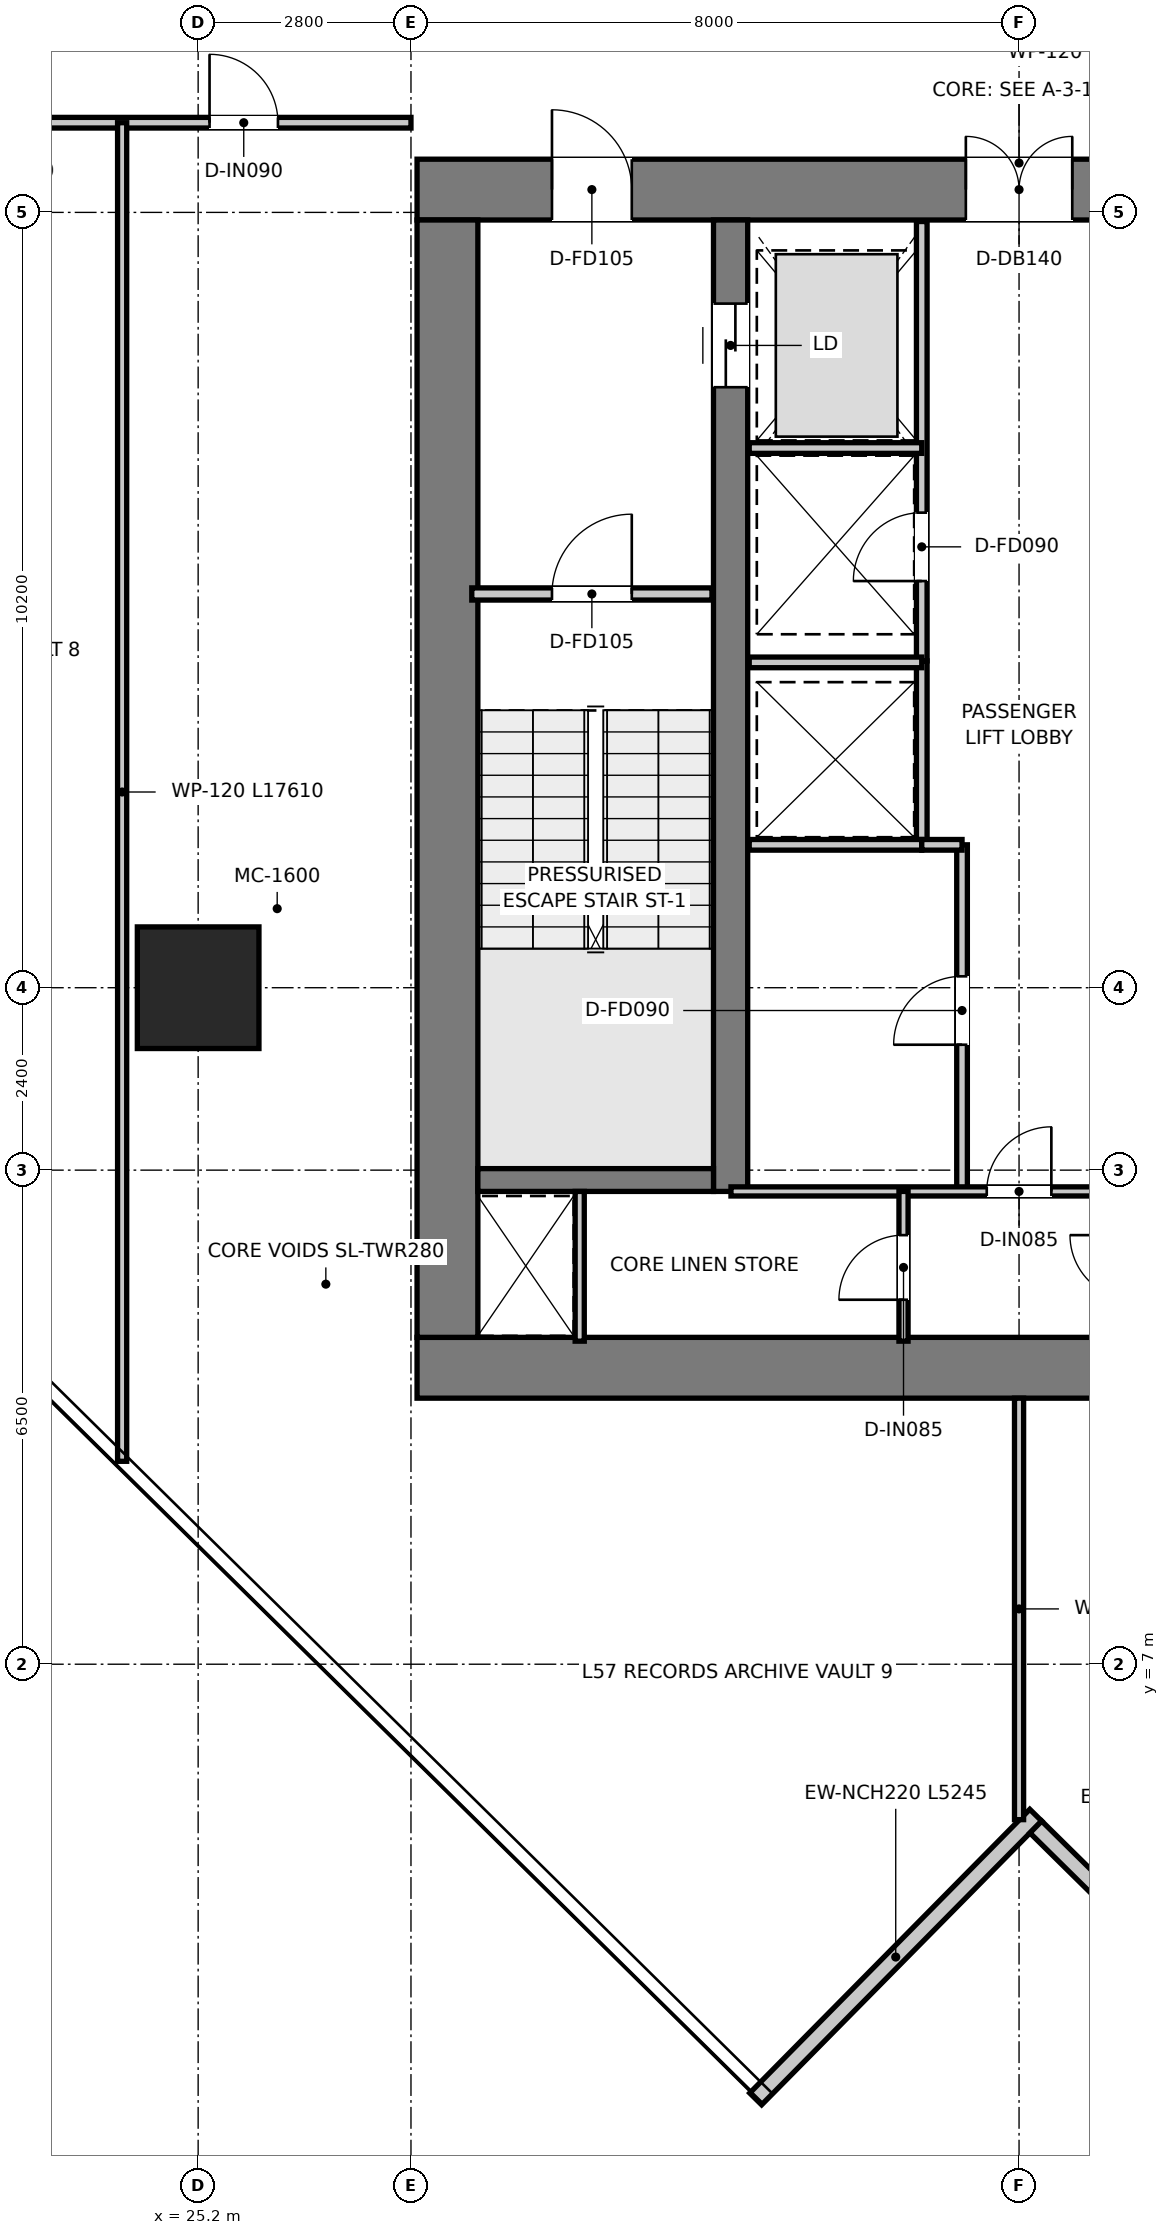
"""IFC4 building model, lengths in metres.
Left out: names, types, materials, properties, quantities, classifications, styles, units other than length and angle.
Written with IfcOpenShell. Run it as: python <this file> out.ifc"""

import sys

from ifc_helpers import new_model, si_unit, direction, frame, frame_2d, origin, origin_2d, place, context, subcontext, project, spatial, rectangle, extrude, source, transform, mapped, element, fill, save


model = new_model("IFC4")
c1 = context("Model", 3, precision=1e-05, world=origin(), true_north=direction((0.0, 1.0)))
c2 = subcontext(c1, "Body", "Model", "MODEL_VIEW")
j1 = project(units=[si_unit("LENGTHUNIT", "METRE"), si_unit("PLANEANGLEUNIT", "RADIAN")], contexts=[c1])
p1 = place(None, origin())
s1 = spatial("IfcSite", under=j1, at=p1, CompositionType="ELEMENT")
p2 = place(p1, origin())
s2 = spatial("IfcBuilding", under=s1, at=p2, CompositionType="ELEMENT")
p3 = place(p2, frame((0.0, 0.0, 234.95)))
s3 = spatial("IfcBuildingStorey", under=s2, at=p3, CompositionType="ELEMENT", Elevation=234.95)
p4 = place(p3, frame((28.08, 10.9, 0.0), z_axis=(0.0, 0.0, 1.0), x_axis=(1.0, 0.0, 0.0)))
e1 = element("IfcWall", 1, at=p4, inside=s3, PredefinedType="SHEAR", context=c2, shape_type="SweptSolid", body=[
    extrude(rectangle(XDim=15.84, YDim=0.8, at=frame_2d((7.92, 0.0))), origin(), (0.0, 0.0, 1.0), 3.95),
])
p5 = place(p3, frame((28.08, 26.4, 0.0), z_axis=(0.0, 0.0, 1.0), x_axis=(1.0, 0.0, 0.0)))
e2 = element("IfcWall", 2, at=p5, inside=s3, PredefinedType="SHEAR", context=c2, shape_type="SweptSolid", body=[
    extrude(rectangle(XDim=15.84, YDim=0.8, at=frame_2d((7.92, 0.0))), origin(), (0.0, 0.0, 1.0), 3.95),
])
p6 = place(p5, frame((7.22, 0.0, 0.0)))
e3 = element("IfcOpeningElement", 3, at=p6, cuts=e2, PredefinedType="OPENING", context=c2, shape_type="SweptSolid", body=[
    extrude(rectangle(XDim=1.4, YDim=2.2, at=frame_2d((0.7, 1.1))), frame((0.0, 0.41, 0.0), z_axis=(0.0, -1.0, 0.0), x_axis=(1.0, 0.0, 0.0)), (0.0, 0.0, 1.0), 0.82),
])
p7 = place(p5, frame((1.775, 0.0, 0.0)))
e4 = element("IfcOpeningElement", 4, at=p7, cuts=e2, PredefinedType="OPENING", context=c2, shape_type="SweptSolid", body=[
    extrude(rectangle(XDim=1.05, YDim=2.1, at=frame_2d((0.525, 1.05))), frame((0.0, 0.41, 0.0), z_axis=(0.0, -1.0, 0.0), x_axis=(1.0, 0.0, 0.0)), (0.0, 0.0, 1.0), 0.82),
])
p8 = place(p5, frame((13.015, 0.0, 0.0)))
e5 = element("IfcOpeningElement", 5, at=p8, cuts=e2, PredefinedType="OPENING", context=c2, shape_type="SweptSolid", body=[
    extrude(rectangle(XDim=1.05, YDim=2.1, at=frame_2d((0.525, 1.05))), frame((0.0, 0.41, 0.0), z_axis=(0.0, -1.0, 0.0), x_axis=(1.0, 0.0, 0.0)), (0.0, 0.0, 1.0), 0.82),
])
p9 = place(p3, frame((28.48, 11.3, 0.0), z_axis=(0.0, 0.0, 1.0), x_axis=(0.0, 1.0, 0.0)))
e6 = element("IfcWall", 6, at=p9, inside=s3, PredefinedType="SHEAR", context=c2, shape_type="SweptSolid", body=[
    extrude(rectangle(XDim=14.7, YDim=0.8, at=frame_2d((7.35, 0.0))), origin(), (0.0, 0.0, 1.0), 3.95),
])
p10 = place(p3, frame((32.205, 13.22, 0.0), z_axis=(0.0, 0.0, 1.0), x_axis=(0.0, 1.0, 0.0)))
e7 = element("IfcWall", 7, at=p10, inside=s3, PredefinedType="SHEAR", context=c2, shape_type="SweptSolid", body=[
    extrude(rectangle(XDim=12.78, YDim=0.45, at=frame_2d((6.39, 0.0))), origin(), (0.0, 0.0, 1.0), 3.95),
])
p11 = place(p10, frame((10.58, 0.0, 0.0)))
e8 = element("IfcOpeningElement", 8, at=p11, cuts=e7, PredefinedType="OPENING", context=c2, shape_type="SweptSolid", body=[
    extrude(rectangle(XDim=1.1, YDim=2.15, at=frame_2d((0.55, 1.075))), frame((0.0, 0.235, 0.0), z_axis=(0.0, -1.0, 0.0), x_axis=(1.0, 0.0, 0.0)), (0.0, 0.0, 1.0), 0.47),
])
p12 = place(p3, frame((28.88, 13.37, 0.0), z_axis=(0.0, 0.0, 1.0), x_axis=(1.0, 0.0, 0.0)))
e9 = element("IfcWall", 9, at=p12, inside=s3, PredefinedType="SHEAR", context=c2, shape_type="SweptSolid", body=[
    extrude(rectangle(XDim=3.1, YDim=0.3, at=frame_2d((1.55, 0.0))), origin(), (0.0, 0.0, 1.0), 3.95),
])
m1 = source(origin(), c2, "Body", "SweptSolid", [
    extrude(rectangle(XDim=1.6, YDim=1.6, at=origin_2d()), origin(), (0.0, 0.0, 1.0), 3.95),
])
p13 = place(p3, frame((25.2, 15.9, 0.0), z_axis=(0.0, 0.0, 1.0), x_axis=(1.0, 0.0, 0.0)))
e10 = element("IfcColumn", 10, at=p13, inside=s3, PredefinedType="USERDEFINED", context=c2, shape_type="MappedRepresentation", body=[
    mapped(m1, transform((0.0, 0.0, 0.0), x_axis=(1.0, 0.0, 0.0), y_axis=(0.0, 1.0, 0.0), z_axis=(0.0, 0.0, 1.0), scale=1.0)),
])
p14 = place(p3, frame((32.535, 1.281, 0.0), z_axis=(0.0, 0.0, 1.0), x_axis=(0.702460059039, 0.711723166305, 0.0)))
e11 = element("IfcWall", 11, at=p14, inside=s3, PredefinedType="ELEMENTEDWALL", context=c2, shape_type="SweptSolid", body=[
    extrude(rectangle(XDim=5.245, YDim=0.22, at=frame_2d((2.623, 0.0))), origin(), (0.0, 0.0, 1.0), 3.67),
])
p15 = place(p3, frame((36.221, 4.858, 0.0), z_axis=(0.0, 0.0, 1.0), x_axis=(0.711731489292, -0.702451626199, 0.0)))
e12 = element("IfcWall", 12, at=p15, inside=s3, PredefinedType="ELEMENTEDWALL", context=c2, shape_type="SweptSolid", body=[
    extrude(rectangle(XDim=5.025, YDim=0.22, at=frame_2d((2.512, 0.0))), origin(), (0.0, 0.0, 1.0), 3.67),
])
p16 = place(p3, frame((28.8, 21.08, 0.0), z_axis=(0.0, 0.0, 1.0), x_axis=(1.0, 0.0, 0.0)))
e13 = element("IfcWall", 13, at=p16, inside=s3, PredefinedType="PARTITIONING", context=c2, shape_type="SweptSolid", body=[
    extrude(rectangle(XDim=3.16, YDim=0.16, at=frame_2d((1.58, 0.0))), origin(), (0.0, 0.0, 1.0), 3.67),
])
p17 = place(p16, frame((1.055, 0.0, 0.0)))
e14 = element("IfcOpeningElement", 14, at=p17, cuts=e13, PredefinedType="OPENING", context=c2, shape_type="SweptSolid", body=[
    extrude(rectangle(XDim=1.05, YDim=2.1, at=frame_2d((0.525, 1.05))), frame((0.0, 0.09, 0.0), z_axis=(0.0, -1.0, 0.0), x_axis=(1.0, 0.0, 0.0)), (0.0, 0.0, 1.0), 0.18),
])
p18 = place(p3, frame((34.72, 20.2, 0.0), z_axis=(0.0, 0.0, 1.0), x_axis=(0.0, 1.0, 0.0)))
e15 = element("IfcWall", 15, at=p18, inside=s3, PredefinedType="PARTITIONING", context=c2, shape_type="SweptSolid", body=[
    extrude(rectangle(XDim=5.78, YDim=0.14, at=frame_2d((2.89, 0.0))), origin(), (0.0, 0.0, 1.0), 2.67),
])
p19 = place(p18, frame((1.05, 0.0, 0.0)))
e16 = element("IfcOpeningElement", 16, at=p19, cuts=e15, PredefinedType="OPENING", context=c2, shape_type="SweptSolid", body=[
    extrude(rectangle(XDim=0.9, YDim=2.1, at=frame_2d((0.45, 1.05))), frame((0.0, 0.08, 0.0), z_axis=(0.0, -1.0, 0.0), x_axis=(1.0, 0.0, 0.0)), (0.0, 0.0, 1.0), 0.16),
])
p20 = place(p3, frame((32.45, 23.0, 0.0), z_axis=(0.0, 0.0, 1.0), x_axis=(1.0, 0.0, 0.0)))
e17 = element("IfcWall", 17, at=p20, inside=s3, PredefinedType="PARTITIONING", context=c2, shape_type="SweptSolid", body=[
    extrude(rectangle(XDim=2.27, YDim=0.14, at=frame_2d((1.135, 0.0))), origin(), (0.0, 0.0, 1.0), 2.67),
])
p21 = place(p3, frame((34.72, 17.78, 0.0), z_axis=(0.0, 0.0, 1.0), x_axis=(0.0, 1.0, 0.0)))
e18 = element("IfcWall", 18, at=p21, inside=s3, PredefinedType="PARTITIONING", context=c2, shape_type="SweptSolid", body=[
    extrude(rectangle(XDim=2.42, YDim=0.14, at=frame_2d((1.21, 0.0))), origin(), (0.0, 0.0, 1.0), 3.67),
])
for number, where, z_axis, x_axis in (
    (19, (32.45, 17.78, 0.0), (0.0, 0.0, 1.0), (1.0, 0.0, 0.0)),
    (20, (32.45, 20.18, 0.0), (0.0, 0.0, 1.0), (1.0, 0.0, 0.0)),
):
    element("IfcWall", number, at=place(p3, frame(where, z_axis=z_axis, x_axis=x_axis)), inside=s3, PredefinedType="PARTITIONING", context=c2, shape_type="SweptSolid", body=[
        extrude(rectangle(XDim=2.27, YDim=0.14, at=frame_2d((1.135, 0.0))), origin(), (0.0, 0.0, 1.0), 3.67),
    ])
p22 = place(p3, frame((35.25, 13.22, 0.0), z_axis=(0.0, 0.0, 1.0), x_axis=(0.0, 1.0, 0.0)))
e21 = element("IfcWall", 21, at=p22, inside=s3, PredefinedType="PARTITIONING", context=c2, shape_type="SweptSolid", body=[
    extrude(rectangle(XDim=4.56, YDim=0.14, at=frame_2d((2.28, 0.0))), origin(), (0.0, 0.0, 1.0), 3.67),
])
p23 = place(p22, frame((1.93, 0.0, 0.0)))
e22 = element("IfcOpeningElement", 22, at=p23, cuts=e21, PredefinedType="OPENING", context=c2, shape_type="SweptSolid", body=[
    extrude(rectangle(XDim=0.9, YDim=2.1, at=frame_2d((0.45, 1.05))), frame((0.0, 0.08, 0.0), z_axis=(0.0, -1.0, 0.0), x_axis=(1.0, 0.0, 0.0)), (0.0, 0.0, 1.0), 0.16),
])
p24 = place(p3, frame((34.72, 17.78, 0.0), z_axis=(0.0, 0.0, 1.0), x_axis=(1.0, 0.0, 0.0)))
e23 = element("IfcWall", 23, at=p24, inside=s3, PredefinedType="PARTITIONING", context=c2, shape_type="SweptSolid", body=[
    extrude(rectangle(XDim=0.53, YDim=0.14, at=frame_2d((0.265, 0.0))), origin(), (0.0, 0.0, 1.0), 3.67),
])
p25 = place(p3, frame((30.22, 11.25, 0.0), z_axis=(0.0, 0.0, 1.0), x_axis=(0.0, 1.0, 0.0)))
e24 = element("IfcWall", 24, at=p25, inside=s3, PredefinedType="PARTITIONING", context=c2, shape_type="SweptSolid", body=[
    extrude(rectangle(XDim=1.97, YDim=0.12, at=frame_2d((0.985, 0.0))), origin(), (0.0, 0.0, 1.0), 3.67),
])
p26 = place(p3, frame((32.21, 13.22, 0.0), z_axis=(0.0, 0.0, 1.0), x_axis=(1.0, 0.0, 0.0)))
e25 = element("IfcWall", 25, at=p26, inside=s3, PredefinedType="PARTITIONING", context=c2, shape_type="SweptSolid", body=[
    extrude(rectangle(XDim=7.58, YDim=0.12, at=frame_2d((3.79, 0.0))), origin(), (0.0, 0.0, 1.0), 3.67),
])
p27 = place(p26, frame((3.365, 0.0, 0.0)))
e26 = element("IfcOpeningElement", 26, at=p27, cuts=e25, PredefinedType="OPENING", context=c2, shape_type="SweptSolid", body=[
    extrude(rectangle(XDim=0.85, YDim=2.1, at=frame_2d((0.425, 1.05))), frame((0.0, 0.07, 0.0), z_axis=(0.0, -1.0, 0.0), x_axis=(1.0, 0.0, 0.0)), (0.0, 0.0, 1.0), 0.14),
])
p28 = place(p3, frame((34.48, 11.25, 0.0), z_axis=(0.0, 0.0, 1.0), x_axis=(0.0, 1.0, 0.0)))
e27 = element("IfcWall", 27, at=p28, inside=s3, PredefinedType="PARTITIONING", context=c2, shape_type="SweptSolid", body=[
    extrude(rectangle(XDim=1.97, YDim=0.12, at=frame_2d((0.985, 0.0))), origin(), (0.0, 0.0, 1.0), 3.67),
])
p29 = place(p28, frame((0.545, 0.0, 0.0)))
e28 = element("IfcOpeningElement", 28, at=p29, cuts=e27, PredefinedType="OPENING", context=c2, shape_type="SweptSolid", body=[
    extrude(rectangle(XDim=0.85, YDim=2.1, at=frame_2d((0.425, 1.05))), frame((0.0, 0.07, 0.0), z_axis=(0.0, -1.0, 0.0), x_axis=(1.0, 0.0, 0.0)), (0.0, 0.0, 1.0), 0.14),
])
p30 = place(p3, frame((13.667, 27.28, 0.0), z_axis=(0.0, 0.0, 1.0), x_axis=(1.0, 0.0, 0.0)))
e29 = element("IfcWall", 29, at=p30, inside=s3, PredefinedType="PARTITIONING", context=c2, shape_type="SweptSolid", body=[
    extrude(rectangle(XDim=14.333, YDim=0.14, at=frame_2d((7.166, 0.0))), origin(), (0.0, 0.0, 1.0), 3.03),
])
p31 = place(p30, frame((1.198, 0.0, 0.0)))
e30 = element("IfcOpeningElement", 30, at=p31, cuts=e29, PredefinedType="OPENING", context=c2, shape_type="SweptSolid", body=[
    extrude(rectangle(XDim=0.9, YDim=2.1, at=frame_2d((0.45, 1.05))), frame((0.0, 0.08, 0.0), z_axis=(0.0, -1.0, 0.0), x_axis=(1.0, 0.0, 0.0)), (0.0, 0.0, 1.0), 0.16),
])
p32 = place(p30, frame((8.683, 0.0, 0.0)))
e31 = element("IfcOpeningElement", 31, at=p32, cuts=e29, PredefinedType="OPENING", context=c2, shape_type="SweptSolid", body=[
    extrude(rectangle(XDim=0.9, YDim=2.1, at=frame_2d((0.45, 1.05))), frame((0.0, 0.08, 0.0), z_axis=(0.0, -1.0, 0.0), x_axis=(1.0, 0.0, 0.0)), (0.0, 0.0, 1.0), 0.16),
])
p33 = place(p30, frame((11.683, 0.0, 0.0)))
e32 = element("IfcOpeningElement", 32, at=p33, cuts=e29, PredefinedType="OPENING", context=c2, shape_type="SweptSolid", body=[
    extrude(rectangle(XDim=0.9, YDim=2.1, at=frame_2d((0.45, 1.05))), frame((0.0, 0.08, 0.0), z_axis=(0.0, -1.0, 0.0), x_axis=(1.0, 0.0, 0.0)), (0.0, 0.0, 1.0), 0.16),
])
p34 = place(p3, frame((36.0, 4.955, 0.0), z_axis=(0.0, 0.0, 1.0), x_axis=(0.0, 1.0, 0.0)))
e33 = element("IfcWall", 33, at=p34, inside=s3, PredefinedType="PARTITIONING", context=c2, shape_type="SweptSolid", body=[
    extrude(rectangle(XDim=5.545, YDim=0.12, at=frame_2d((2.772, 0.0))), origin(), (0.0, 0.0, 1.0), 3.67),
])
p35 = place(p3, frame((24.2, 9.669, 0.0), z_axis=(0.0, 0.0, 1.0), x_axis=(0.0, 1.0, 0.0)))
e34 = element("IfcWall", 34, at=p35, inside=s3, PredefinedType="PARTITIONING", context=c2, shape_type="SweptSolid", body=[
    extrude(rectangle(XDim=17.611, YDim=0.12, at=frame_2d((8.805, 0.0))), origin(), (0.0, 0.0, 1.0), 3.18),
])
p36 = place(p17, origin())
e35 = element("IfcDoor", 35, at=p36, inside=s3, OperationType="SINGLE_SWING_RIGHT", PredefinedType="DOOR", context=c2, shape_type="SweptSolid", body=[
    extrude(rectangle(XDim=1.05, YDim=2.1, at=frame_2d((0.525, 1.05))), frame((0.0, 0.025, 0.0), z_axis=(0.0, -1.0, 0.0), x_axis=(1.0, 0.0, 0.0)), (0.0, 0.0, 1.0), 0.05),
])
fill(e14, e35)
p37 = place(p6, origin())
e36 = element("IfcDoor", 36, at=p37, inside=s3, OperationType="DOUBLE_DOOR_SINGLE_SWING", PredefinedType="DOOR", context=c2, shape_type="SweptSolid", body=[
    extrude(rectangle(XDim=1.4, YDim=2.2, at=frame_2d((0.7, 1.1))), frame((0.0, 0.025, 0.0), z_axis=(0.0, -1.0, 0.0), x_axis=(1.0, 0.0, 0.0)), (0.0, 0.0, 1.0), 0.05),
])
fill(e3, e36)
p38 = place(p7, origin())
e37 = element("IfcDoor", 37, at=p38, inside=s3, OperationType="SINGLE_SWING_LEFT", PredefinedType="DOOR", context=c2, shape_type="SweptSolid", body=[
    extrude(rectangle(XDim=1.05, YDim=2.1, at=frame_2d((0.525, 1.05))), frame((0.0, 0.025, 0.0), z_axis=(0.0, -1.0, 0.0), x_axis=(1.0, 0.0, 0.0)), (0.0, 0.0, 1.0), 0.05),
])
fill(e4, e37)
p39 = place(p11, origin())
e38 = element("IfcDoor", 38, at=p39, inside=s3, OperationType="DOUBLE_DOOR_SLIDING", PredefinedType="DOOR", context=c2, shape_type="SweptSolid", body=[
    extrude(rectangle(XDim=1.1, YDim=2.15, at=frame_2d((0.55, 1.075))), frame((0.0, 0.025, 0.0), z_axis=(0.0, -1.0, 0.0), x_axis=(1.0, 0.0, 0.0)), (0.0, 0.0, 1.0), 0.05),
])
fill(e8, e38)
p40 = place(p19, origin())
e39 = element("IfcDoor", 39, at=p40, inside=s3, OperationType="SINGLE_SWING_LEFT", PredefinedType="DOOR", context=c2, shape_type="SweptSolid", body=[
    extrude(rectangle(XDim=0.9, YDim=2.1, at=frame_2d((0.45, 1.05))), frame((0.0, 0.025, 0.0), z_axis=(0.0, -1.0, 0.0), x_axis=(1.0, 0.0, 0.0)), (0.0, 0.0, 1.0), 0.05),
])
fill(e16, e39)
p41 = place(p23, origin())
e40 = element("IfcDoor", 40, at=p41, inside=s3, OperationType="SINGLE_SWING_LEFT", PredefinedType="DOOR", context=c2, shape_type="SweptSolid", body=[
    extrude(rectangle(XDim=0.9, YDim=2.1, at=frame_2d((0.45, 1.05))), frame((0.0, 0.025, 0.0), z_axis=(0.0, -1.0, 0.0), x_axis=(1.0, 0.0, 0.0)), (0.0, 0.0, 1.0), 0.05),
])
fill(e22, e40)
p42 = place(p27, origin())
e41 = element("IfcDoor", 41, at=p42, inside=s3, OperationType="SINGLE_SWING_RIGHT", PredefinedType="DOOR", context=c2, shape_type="SweptSolid", body=[
    extrude(rectangle(XDim=0.85, YDim=2.1, at=frame_2d((0.425, 1.05))), frame((0.0, 0.025, 0.0), z_axis=(0.0, -1.0, 0.0), x_axis=(1.0, 0.0, 0.0)), (0.0, 0.0, 1.0), 0.05),
])
fill(e26, e41)
p43 = place(p29, origin())
e42 = element("IfcDoor", 42, at=p43, inside=s3, OperationType="SINGLE_SWING_LEFT", PredefinedType="DOOR", context=c2, shape_type="SweptSolid", body=[
    extrude(rectangle(XDim=0.85, YDim=2.1, at=frame_2d((0.425, 1.05))), frame((0.0, 0.025, 0.0), z_axis=(0.0, -1.0, 0.0), x_axis=(1.0, 0.0, 0.0)), (0.0, 0.0, 1.0), 0.05),
])
fill(e28, e42)
p44 = place(p33, origin())
e43 = element("IfcDoor", 43, at=p44, inside=s3, OperationType="SINGLE_SWING_LEFT", PredefinedType="DOOR", context=c2, shape_type="SweptSolid", body=[
    extrude(rectangle(XDim=0.9, YDim=2.1, at=frame_2d((0.45, 1.05))), frame((0.0, 0.025, 0.0), z_axis=(0.0, -1.0, 0.0), x_axis=(1.0, 0.0, 0.0)), (0.0, 0.0, 1.0), 0.05),
])
fill(e32, e43)
save(model, sys.argv[1])
